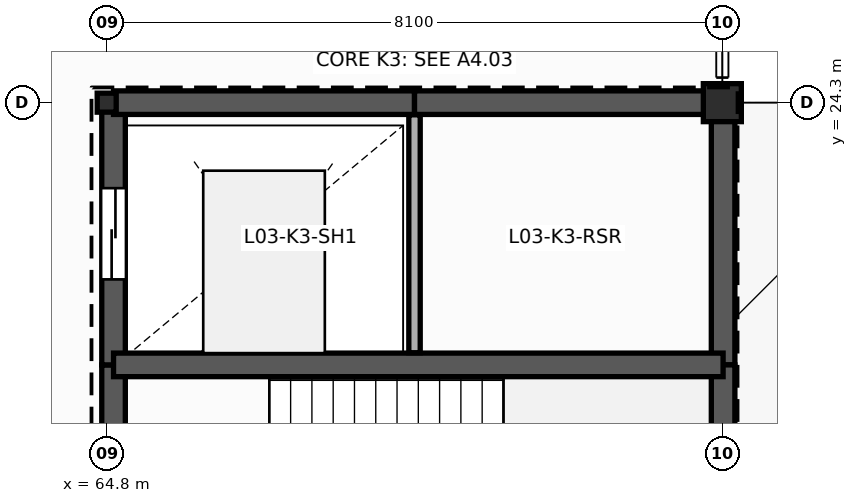
"""IFC4 building model, lengths in metres.
Left out: names, types, materials, properties, quantities, classifications, styles, units other than length and angle.
Written with IfcOpenShell. Run it as: python <this file> out.ifc"""

import sys

from ifc_helpers import new_model, si_unit, direction, frame, frame_2d, origin, origin_2d, place, context, subcontext, project, spatial, rectangle, hollow_rectangle, extrude, element, fill, save


model = new_model("IFC4")
c1 = context("Model", 3, precision=1e-05, world=origin(), true_north=direction((0.0, 1.0)))
c2 = subcontext(c1, "Body", "Model", "MODEL_VIEW")
j1 = project(units=[si_unit("LENGTHUNIT", "METRE"), si_unit("PLANEANGLEUNIT", "RADIAN")], contexts=[c1])
p1 = place(None, origin())
s1 = spatial("IfcSite", under=j1, at=p1, CompositionType="ELEMENT")
p2 = place(p1, origin())
s2 = spatial("IfcBuilding", under=s1, at=p2, CompositionType="ELEMENT")
p3 = place(p2, frame((0.0, 0.0, 15.0)))
s3 = spatial("IfcBuildingStorey", under=s2, at=p3, CompositionType="ELEMENT", Elevation=15.0)
p4 = place(p3, frame((64.8, 24.3, 0.0), z_axis=(0.0, 0.0, 1.0), x_axis=(1.0, 0.0, 0.0)))
e1 = element("IfcColumn", 1, at=p4, inside=s3, PredefinedType="COLUMN", context=c2, shape_type="SweptSolid", body=[
    extrude(hollow_rectangle(XDim=0.25, YDim=0.25, WallThickness=0.012, InnerFilletRadius=0.012, OuterFilletRadius=0.025, at=origin_2d()), origin(), (0.0, 0.0, 1.0), 4.2),
])
p5 = place(p3, frame((72.9, 24.3, 0.0), z_axis=(0.0, 0.0, 1.0), x_axis=(1.0, 0.0, 0.0)))
e2 = element("IfcColumn", 2, at=p5, inside=s3, PredefinedType="COLUMN", context=c2, shape_type="SweptSolid", body=[
    extrude(rectangle(XDim=0.5, YDim=0.5, at=origin_2d()), origin(), (0.0, 0.0, 1.0), 4.2),
])
p6 = place(p3, frame((64.89, 16.45, 0.0), z_axis=(0.0, 0.0, 1.0), x_axis=(0.0, 1.0, 0.0)))
e3 = element("IfcWall", 3, at=p6, inside=s3, PredefinedType="SHEAR", context=c2, shape_type="SweptSolid", body=[
    extrude(rectangle(XDim=4.4, YDim=0.31, at=frame_2d((2.2, 0.0))), origin(), (0.0, 0.0, 1.0), 4.2),
])
p7 = place(p6, frame((1.35, 0.0, 0.0)))
e4 = element("IfcOpeningElement", 4, at=p7, cuts=e3, PredefinedType="OPENING", context=c2, shape_type="SweptSolid", body=[
    extrude(rectangle(XDim=1.2, YDim=2.25, at=frame_2d((0.6, 1.125))), frame((0.0, 0.165, 0.0), z_axis=(0.0, -1.0, 0.0), x_axis=(1.0, 0.0, 0.0)), (0.0, 0.0, 1.0), 0.33),
])
p8 = place(p3, frame((64.89, 20.85, 0.0), z_axis=(0.0, 0.0, 1.0), x_axis=(0.0, 1.0, 0.0)))
e5 = element("IfcWall", 5, at=p8, inside=s3, PredefinedType="SHEAR", context=c2, shape_type="SweptSolid", body=[
    extrude(rectangle(XDim=3.45, YDim=0.31, at=frame_2d((1.725, 0.0))), origin(), (0.0, 0.0, 1.0), 4.2),
])
p9 = place(p8, frame((1.125, 0.0, 0.0)))
e6 = element("IfcOpeningElement", 6, at=p9, cuts=e5, PredefinedType="OPENING", context=c2, shape_type="SweptSolid", body=[
    extrude(rectangle(XDim=1.2, YDim=2.2, at=frame_2d((0.6, 1.1))), frame((0.0, 0.165, 0.0), z_axis=(0.0, -1.0, 0.0), x_axis=(1.0, 0.0, 0.0)), (0.0, 0.0, 1.0), 0.33),
])
p10 = place(p3, frame((64.89, 24.3, 0.0), z_axis=(0.0, 0.0, 1.0), x_axis=(1.0, 0.0, 0.0)))
e7 = element("IfcWall", 7, at=p10, inside=s3, PredefinedType="SHEAR", context=c2, shape_type="SweptSolid", body=[
    extrude(rectangle(XDim=3.96, YDim=0.31, at=frame_2d((1.98, 0.0))), origin(), (0.0, 0.0, 1.0), 4.2),
])
p11 = place(p3, frame((68.85, 24.3, 0.0), z_axis=(0.0, 0.0, 1.0), x_axis=(1.0, 0.0, 0.0)))
e8 = element("IfcWall", 8, at=p11, inside=s3, PredefinedType="SHEAR", context=c2, shape_type="SweptSolid", body=[
    extrude(rectangle(XDim=4.06, YDim=0.31, at=frame_2d((2.03, 0.0))), origin(), (0.0, 0.0, 1.0), 4.2),
])
p12 = place(p3, frame((72.91, 24.3, 0.0), z_axis=(0.0, 0.0, 1.0), x_axis=(0.0, -1.0, 0.0)))
e9 = element("IfcWall", 9, at=p12, inside=s3, PredefinedType="SHEAR", context=c2, shape_type="SweptSolid", body=[
    extrude(rectangle(XDim=3.45, YDim=0.31, at=frame_2d((1.725, 0.0))), origin(), (0.0, 0.0, 1.0), 4.2),
])
p13 = place(p3, frame((72.91, 20.85, 0.0), z_axis=(0.0, 0.0, 1.0), x_axis=(0.0, -1.0, 0.0)))
e10 = element("IfcWall", 10, at=p13, inside=s3, PredefinedType="SHEAR", context=c2, shape_type="SweptSolid", body=[
    extrude(rectangle(XDim=4.4, YDim=0.31, at=frame_2d((2.2, 0.0))), origin(), (0.0, 0.0, 1.0), 4.2),
])
p14 = place(p3, frame((64.89, 20.85, 0.0), z_axis=(0.0, 0.0, 1.0), x_axis=(1.0, 0.0, 0.0)))
e11 = element("IfcWall", 11, at=p14, inside=s3, PredefinedType="SHEAR", context=c2, shape_type="SweptSolid", body=[
    extrude(rectangle(XDim=8.02, YDim=0.31, at=frame_2d((4.01, 0.0))), origin(), (0.0, 0.0, 1.0), 4.2),
])
p15 = place(p3, frame((68.85, 21.01, 0.0), z_axis=(0.0, 0.0, 1.0), x_axis=(0.0, 1.0, 0.0)))
e12 = element("IfcWall", 12, at=p15, inside=s3, PredefinedType="PLUMBINGWALL", context=c2, shape_type="SweptSolid", body=[
    extrude(rectangle(XDim=3.13, YDim=0.15, at=frame_2d((1.565, 0.0))), origin(), (0.0, 0.0, 1.0), 3.85),
])
p16 = place(p9, origin())
e13 = element("IfcDoor", 13, at=p16, inside=s3, OperationType="SLIDING_TO_LEFT", PredefinedType="DOOR", context=c2, shape_type="SweptSolid", body=[
    extrude(rectangle(XDim=1.2, YDim=2.2, at=frame_2d((0.6, 1.1))), frame((0.0, 0.025, 0.0), z_axis=(0.0, -1.0, 0.0), x_axis=(1.0, 0.0, 0.0)), (0.0, 0.0, 1.0), 0.05),
])
fill(e6, e13)
save(model, sys.argv[1])
